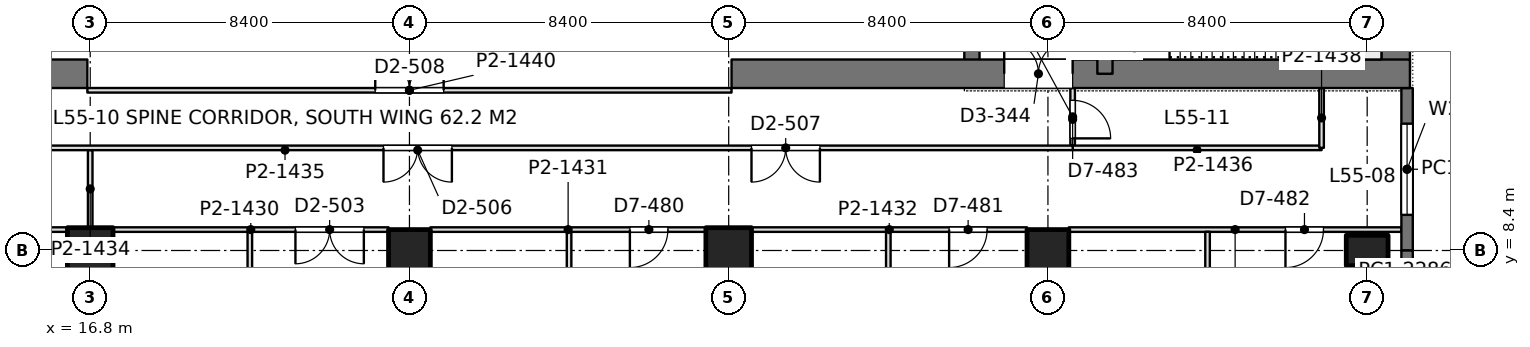
"""IFC4 building model, lengths in metres.
Left out: names, types, materials, properties, quantities, classifications, styles, units other than length and angle.
Written with IfcOpenShell. Run it as: python <this file> out.ifc"""

import sys

from ifc_helpers import new_model, si_unit, direction, frame, frame_2d, origin, origin_2d, place, context, subcontext, project, spatial, rectangle, extrude, element, fill, save


model = new_model("IFC4")
c1 = context("Model", 3, precision=1e-05, world=origin(), true_north=direction((0.0, 1.0)))
c2 = subcontext(c1, "Body", "Model", "MODEL_VIEW")
j1 = project(units=[si_unit("LENGTHUNIT", "METRE"), si_unit("PLANEANGLEUNIT", "RADIAN")], contexts=[c1])
p1 = place(None, origin())
s1 = spatial("IfcSite", under=j1, at=p1, CompositionType="ELEMENT")
p2 = place(p1, origin())
s2 = spatial("IfcBuilding", under=s1, at=p2, CompositionType="ELEMENT")
p3 = place(p2, frame((0.0, 0.0, 240.6)))
s3 = spatial("IfcBuildingStorey", under=s2, at=p3, CompositionType="ELEMENT", Elevation=240.6)
p4 = place(p3, frame((16.8, 8.4, 0.0), z_axis=(0.0, 0.0, 1.0), x_axis=(1.0, 0.0, 0.0)))
e1 = element("IfcColumn", 1, at=p4, inside=s3, PredefinedType="COLUMN", context=c2, shape_type="SweptSolid", body=[
    extrude(rectangle(XDim=1.2, YDim=1.2, at=origin_2d()), origin(), (0.0, 0.0, 1.0), 4.2),
])
p5 = place(p3, frame((25.2, 8.4, 0.0), z_axis=(0.0, 0.0, 1.0), x_axis=(1.0, 0.0, 0.0)))
e2 = element("IfcColumn", 2, at=p5, inside=s3, PredefinedType="COLUMN", context=c2, shape_type="SweptSolid", body=[
    extrude(rectangle(XDim=1.1, YDim=1.1, at=origin_2d()), origin(), (0.0, 0.0, 1.0), 4.2),
])
p6 = place(p3, frame((33.6, 8.4, 0.0), z_axis=(0.0, 0.0, 1.0), x_axis=(1.0, 0.0, 0.0)))
e3 = element("IfcColumn", 3, at=p6, inside=s3, PredefinedType="COLUMN", context=c2, shape_type="SweptSolid", body=[
    extrude(rectangle(XDim=1.2, YDim=1.2, at=origin_2d()), origin(), (0.0, 0.0, 1.0), 4.2),
])
p7 = place(p3, frame((42.0, 8.4, 0.0), z_axis=(0.0, 0.0, 1.0), x_axis=(1.0, 0.0, 0.0)))
e4 = element("IfcColumn", 4, at=p7, inside=s3, PredefinedType="COLUMN", context=c2, shape_type="SweptSolid", body=[
    extrude(rectangle(XDim=1.1, YDim=1.1, at=origin_2d()), origin(), (0.0, 0.0, 1.0), 4.2),
])
p8 = place(p3, frame((50.4, 8.4, 0.0), z_axis=(0.0, 0.0, 1.0), x_axis=(0.0, 1.0, 0.0)))
e5 = element("IfcColumn", 5, at=p8, inside=s3, PredefinedType="COLUMN", context=c2, shape_type="SweptSolid", body=[
    extrude(rectangle(XDim=0.8, YDim=1.1, at=origin_2d()), origin(), (0.0, 0.0, 1.0), 4.2),
])
p9 = place(p3, frame((-1.125, 13.05, 0.0), z_axis=(0.0, 0.0, 1.0), x_axis=(1.0, 0.0, 0.0)))
e6 = element("IfcWall", 6, at=p9, inside=s3, PredefinedType="SHEAR", context=c2, shape_type="SweptSolid", body=[
    extrude(rectangle(XDim=17.85, YDim=0.75, at=frame_2d((8.925, 0.0))), origin(), (0.0, 0.0, 1.0), 4.2),
])
p10 = place(p9, frame((8.875, 0.0, 0.0)))
e7 = element("IfcOpeningElement", 7, at=p10, cuts=e6, PredefinedType="OPENING", context=c2, shape_type="SweptSolid", body=[
    extrude(rectangle(XDim=1.8, YDim=2.4, at=frame_2d((0.9, 1.2))), frame((0.0, 0.385, 0.0), z_axis=(0.0, -1.0, 0.0), x_axis=(1.0, 0.0, 0.0)), (0.0, 0.0, 1.0), 0.77),
])
p11 = place(p3, frame((33.675, 13.05, 0.0), z_axis=(0.0, 0.0, 1.0), x_axis=(1.0, 0.0, 0.0)))
e8 = element("IfcWall", 8, at=p11, inside=s3, PredefinedType="SHEAR", context=c2, shape_type="SweptSolid", body=[
    extrude(rectangle(XDim=17.85, YDim=0.75, at=frame_2d((8.925, 0.0))), origin(), (0.0, 0.0, 1.0), 4.2),
])
p12 = place(p11, frame((7.175, 0.0, 0.0)))
e9 = element("IfcOpeningElement", 9, at=p12, cuts=e8, PredefinedType="OPENING", context=c2, shape_type="SweptSolid", body=[
    extrude(rectangle(XDim=1.8, YDim=2.4, at=frame_2d((0.9, 1.2))), frame((0.0, 0.385, 0.0), z_axis=(0.0, -1.0, 0.0), x_axis=(1.0, 0.0, 0.0)), (0.0, 0.0, 1.0), 0.77),
])
p13 = place(p3, frame((51.15, 13.05, 0.0), z_axis=(0.0, 0.0, 1.0), x_axis=(0.0, 1.0, 0.0)))
e10 = element("IfcWall", 10, at=p13, inside=s3, PredefinedType="SHEAR", context=c2, shape_type="SweptSolid", body=[
    extrude(rectangle(XDim=24.3, YDim=0.75, at=frame_2d((12.15, 0.0))), origin(), (0.0, 0.0, 1.0), 4.2),
])
p14 = place(p3, frame((43.5, 13.05, 0.0), z_axis=(0.0, 0.0, 1.0), x_axis=(0.0, 1.0, 0.0)))
e11 = element("IfcWall", 11, at=p14, inside=s3, PredefinedType="SHEAR", context=c2, shape_type="SweptSolid", body=[
    extrude(rectangle(XDim=24.3, YDim=0.4, at=frame_2d((12.15, 0.0))), origin(), (0.0, 0.0, 1.0), 4.2),
])
p15 = place(p14, frame((1.3, 0.0, 0.0)))
e12 = element("IfcOpeningElement", 12, at=p15, cuts=e11, PredefinedType="OPENING", context=c2, shape_type="SweptSolid", body=[
    extrude(rectangle(XDim=1.0, YDim=2.2, at=frame_2d((0.5, 1.1))), frame((0.0, 0.21, 0.0), z_axis=(0.0, -1.0, 0.0), x_axis=(1.0, 0.0, 0.0)), (0.0, 0.0, 1.0), 0.42),
])
p16 = place(p14, frame((22.0, 0.0, 0.0)))
e13 = element("IfcOpeningElement", 13, at=p16, cuts=e11, PredefinedType="OPENING", context=c2, shape_type="SweptSolid", body=[
    extrude(rectangle(XDim=1.0, YDim=2.2, at=frame_2d((0.5, 1.1))), frame((0.0, 0.21, 0.0), z_axis=(0.0, -1.0, 0.0), x_axis=(1.0, 0.0, 0.0)), (0.0, 0.0, 1.0), 0.42),
])
p17 = place(p14, frame((5.55, 0.0, 0.0)))
e14 = element("IfcOpeningElement", 14, at=p17, cuts=e11, PredefinedType="OPENING", context=c2, shape_type="SweptSolid", body=[
    extrude(rectangle(XDim=1.0, YDim=2.2, at=frame_2d((0.5, 1.1))), frame((0.0, 0.21, 0.0), z_axis=(0.0, -1.0, 0.0), x_axis=(1.0, 0.0, 0.0)), (0.0, 0.0, 1.0), 0.42),
])
p18 = place(p14, frame((9.55, 0.0, 0.0)))
e15 = element("IfcOpeningElement", 15, at=p18, cuts=e11, PredefinedType="OPENING", context=c2, shape_type="SweptSolid", body=[
    extrude(rectangle(XDim=1.0, YDim=2.2, at=frame_2d((0.5, 1.1))), frame((0.0, 0.21, 0.0), z_axis=(0.0, -1.0, 0.0), x_axis=(1.0, 0.0, 0.0)), (0.0, 0.0, 1.0), 0.42),
])
p19 = place(p14, frame((12.8, 0.0, 0.0)))
e16 = element("IfcOpeningElement", 16, at=p19, cuts=e11, PredefinedType="OPENING", context=c2, shape_type="SweptSolid", body=[
    extrude(rectangle(XDim=1.1, YDim=2.2, at=frame_2d((0.55, 1.1))), frame((0.0, 0.21, 0.0), z_axis=(0.0, -1.0, 0.0), x_axis=(1.0, 0.0, 0.0)), (0.0, 0.0, 1.0), 0.42),
])
p20 = place(p14, frame((15.538, 0.0, 0.0)))
e17 = element("IfcOpeningElement", 17, at=p20, cuts=e11, PredefinedType="OPENING", context=c2, shape_type="SweptSolid", body=[
    extrude(rectangle(XDim=1.1, YDim=2.2, at=frame_2d((0.55, 1.1))), frame((0.0, 0.21, 0.0), z_axis=(0.0, -1.0, 0.0), x_axis=(1.0, 0.0, 0.0)), (0.0, 0.0, 1.0), 0.42),
])
p21 = place(p14, frame((18.262, 0.0, 0.0)))
e18 = element("IfcOpeningElement", 18, at=p21, cuts=e11, PredefinedType="OPENING", context=c2, shape_type="SweptSolid", body=[
    extrude(rectangle(XDim=1.1, YDim=2.2, at=frame_2d((0.55, 1.1))), frame((0.0, 0.21, 0.0), z_axis=(0.0, -1.0, 0.0), x_axis=(1.0, 0.0, 0.0)), (0.0, 0.0, 1.0), 0.42),
])
p22 = place(p3, frame((40.0, 13.05, 0.0), z_axis=(0.0, 0.0, 1.0), x_axis=(0.0, 1.0, 0.0)))
e19 = element("IfcWall", 19, at=p22, inside=s3, PredefinedType="SHEAR", context=c2, shape_type="SweptSolid", body=[
    extrude(rectangle(XDim=24.3, YDim=0.4, at=frame_2d((12.15, 0.0))), origin(), (0.0, 0.0, 1.0), 4.2),
])
p23 = place(p22, frame((15.75, 0.0, 0.0)))
e20 = element("IfcOpeningElement", 20, at=p23, cuts=e19, PredefinedType="OPENING", context=c2, shape_type="SweptSolid", body=[
    extrude(rectangle(XDim=1.1, YDim=2.2, at=frame_2d((0.55, 1.1))), frame((0.0, 0.21, 0.0), z_axis=(0.0, -1.0, 0.0), x_axis=(1.0, 0.0, 0.0)), (0.0, 0.0, 1.0), 0.42),
])
p24 = place(p22, frame((18.6, 0.0, 0.0)))
e21 = element("IfcOpeningElement", 21, at=p24, cuts=e19, PredefinedType="OPENING", context=c2, shape_type="SweptSolid", body=[
    extrude(rectangle(XDim=1.1, YDim=2.2, at=frame_2d((0.55, 1.1))), frame((0.0, 0.21, 0.0), z_axis=(0.0, -1.0, 0.0), x_axis=(1.0, 0.0, 0.0)), (0.0, 0.0, 1.0), 0.42),
])
p25 = place(p22, frame((21.45, 0.0, 0.0)))
e22 = element("IfcOpeningElement", 22, at=p25, cuts=e19, PredefinedType="OPENING", context=c2, shape_type="SweptSolid", body=[
    extrude(rectangle(XDim=1.1, YDim=2.2, at=frame_2d((0.55, 1.1))), frame((0.0, 0.21, 0.0), z_axis=(0.0, -1.0, 0.0), x_axis=(1.0, 0.0, 0.0)), (0.0, 0.0, 1.0), 0.42),
])
p26 = place(p22, frame((8.65, 0.0, 0.0)))
e23 = element("IfcOpeningElement", 23, at=p26, cuts=e19, PredefinedType="OPENING", context=c2, shape_type="SweptSolid", body=[
    extrude(rectangle(XDim=1.8, YDim=2.4, at=frame_2d((0.9, 1.2))), frame((0.0, 0.21, 0.0), z_axis=(0.0, -1.0, 0.0), x_axis=(1.0, 0.0, 0.0)), (0.0, 0.0, 1.0), 0.42),
])
p27 = place(p3, frame((51.45, 12.675, 0.0), z_axis=(0.0, 0.0, 1.0), x_axis=(0.0, -1.0, 0.0)))
e24 = element("IfcWall", 24, at=p27, inside=s3, PredefinedType="SOLIDWALL", context=c2, shape_type="SweptSolid", body=[
    extrude(rectangle(XDim=4.275, YDim=0.3, at=frame_2d((2.138, 0.0))), origin(), (0.0, 0.0, 1.0), 4.0),
])
p28 = place(p27, frame((0.938, 0.0, 0.9)))
e25 = element("IfcOpeningElement", 25, at=p28, cuts=e24, PredefinedType="OPENING", context=c2, shape_type="SweptSolid", body=[
    extrude(rectangle(XDim=2.4, YDim=1.9, at=frame_2d((1.2, 0.95))), frame((0.0, 0.16, 0.0), z_axis=(0.0, -1.0, 0.0), x_axis=(1.0, 0.0, 0.0)), (0.0, 0.0, 1.0), 0.32),
])
p29 = place(p3, frame((51.45, 8.4, 0.0), z_axis=(0.0, 0.0, 1.0), x_axis=(0.0, -1.0, 0.0)))
e26 = element("IfcWall", 26, at=p29, inside=s3, PredefinedType="SOLIDWALL", context=c2, shape_type="SweptSolid", body=[
    extrude(rectangle(XDim=2.485, YDim=0.3, at=frame_2d((1.243, 0.0))), origin(), (0.0, 0.0, 1.0), 4.0),
])
p30 = place(p3, frame((8.949, 8.95, 0.0), z_axis=(0.0, 0.0, 1.0), x_axis=(1.0, 0.0, 0.0)))
e27 = element("IfcWall", 27, at=p30, inside=s3, PredefinedType="PARTITIONING", context=c2, shape_type="SweptSolid", body=[
    extrude(rectangle(XDim=7.252, YDim=0.12, at=frame_2d((3.626, 0.0))), origin(), (0.0, 0.0, 1.0), 3.4),
])
p31 = place(p30, frame((5.251, 0.0, 0.0)))
e28 = element("IfcOpeningElement", 28, at=p31, cuts=e27, PredefinedType="OPENING", context=c2, shape_type="SweptSolid", body=[
    extrude(rectangle(XDim=1.0, YDim=2.4, at=frame_2d((0.5, 1.2))), frame((0.0, 0.07, 0.0), z_axis=(0.0, -1.0, 0.0), x_axis=(1.0, 0.0, 0.0)), (0.0, 0.0, 1.0), 0.14),
])
p32 = place(p3, frame((17.399, 8.95, 0.0), z_axis=(0.0, 0.0, 1.0), x_axis=(1.0, 0.0, 0.0)))
e29 = element("IfcWall", 29, at=p32, inside=s3, PredefinedType="PARTITIONING", context=c2, shape_type="SweptSolid", body=[
    extrude(rectangle(XDim=7.252, YDim=0.12, at=frame_2d((3.626, 0.0))), origin(), (0.0, 0.0, 1.0), 3.4),
])
p33 = place(p32, frame((4.801, 0.0, 0.0)))
e30 = element("IfcOpeningElement", 30, at=p33, cuts=e29, PredefinedType="OPENING", context=c2, shape_type="SweptSolid", body=[
    extrude(rectangle(XDim=1.8, YDim=2.2, at=frame_2d((0.9, 1.1))), frame((0.0, 0.07, 0.0), z_axis=(0.0, -1.0, 0.0), x_axis=(1.0, 0.0, 0.0)), (0.0, 0.0, 1.0), 0.14),
])
p34 = place(p3, frame((25.749, 8.95, 0.0), z_axis=(0.0, 0.0, 1.0), x_axis=(1.0, 0.0, 0.0)))
e31 = element("IfcWall", 31, at=p34, inside=s3, PredefinedType="PARTITIONING", context=c2, shape_type="SweptSolid", body=[
    extrude(rectangle(XDim=7.252, YDim=0.12, at=frame_2d((3.626, 0.0))), origin(), (0.0, 0.0, 1.0), 3.4),
])
p35 = place(p34, frame((5.251, 0.0, 0.0)))
e32 = element("IfcOpeningElement", 32, at=p35, cuts=e31, PredefinedType="OPENING", context=c2, shape_type="SweptSolid", body=[
    extrude(rectangle(XDim=1.0, YDim=2.4, at=frame_2d((0.5, 1.2))), frame((0.0, 0.07, 0.0), z_axis=(0.0, -1.0, 0.0), x_axis=(1.0, 0.0, 0.0)), (0.0, 0.0, 1.0), 0.14),
])
p36 = place(p3, frame((34.199, 8.95, 0.0), z_axis=(0.0, 0.0, 1.0), x_axis=(1.0, 0.0, 0.0)))
e33 = element("IfcWall", 33, at=p36, inside=s3, PredefinedType="PARTITIONING", context=c2, shape_type="SweptSolid", body=[
    extrude(rectangle(XDim=7.252, YDim=0.12, at=frame_2d((3.626, 0.0))), origin(), (0.0, 0.0, 1.0), 3.4),
])
p37 = place(p36, frame((5.201, 0.0, 0.0)))
e34 = element("IfcOpeningElement", 34, at=p37, cuts=e33, PredefinedType="OPENING", context=c2, shape_type="SweptSolid", body=[
    extrude(rectangle(XDim=1.0, YDim=2.4, at=frame_2d((0.5, 1.2))), frame((0.0, 0.07, 0.0), z_axis=(0.0, -1.0, 0.0), x_axis=(1.0, 0.0, 0.0)), (0.0, 0.0, 1.0), 0.14),
])
p38 = place(p3, frame((42.549, 8.95, 0.0), z_axis=(0.0, 0.0, 1.0), x_axis=(1.0, 0.0, 0.0)))
e35 = element("IfcWall", 35, at=p38, inside=s3, PredefinedType="PARTITIONING", context=c2, shape_type="SweptSolid", body=[
    extrude(rectangle(XDim=8.753, YDim=0.12, at=frame_2d((4.376, 0.0))), origin(), (0.0, 0.0, 1.0), 3.62),
])
p39 = place(p38, frame((5.701, 0.0, 0.0)))
e36 = element("IfcOpeningElement", 36, at=p39, cuts=e35, PredefinedType="OPENING", context=c2, shape_type="SweptSolid", body=[
    extrude(rectangle(XDim=1.0, YDim=2.4, at=frame_2d((0.5, 1.2))), frame((0.0, 0.07, 0.0), z_axis=(0.0, -1.0, 0.0), x_axis=(1.0, 0.0, 0.0)), (0.0, 0.0, 1.0), 0.14),
])
for number, where, z_axis, x_axis in (
    (37, (21.0, 4.7, 0.0), (0.0, 0.0, 1.0), (0.0, 1.0, 0.0)),
    (38, (29.4, 4.7, 0.0), (0.0, 0.0, 1.0), (0.0, 1.0, 0.0)),
    (39, (37.8, 4.7, 0.0), (0.0, 0.0, 1.0), (0.0, 1.0, 0.0)),
    (40, (46.2, 4.7, 0.0), (0.0, 0.0, 1.0), (0.0, 1.0, 0.0)),
):
    element("IfcWall", number, at=place(p3, frame(where, z_axis=z_axis, x_axis=x_axis)), inside=s3, PredefinedType="PARTITIONING", context=c2, shape_type="SweptSolid", body=[
        extrude(rectangle(XDim=4.192, YDim=0.12, at=frame_2d((2.096, 0.0))), origin(), (0.0, 0.0, 1.0), 3.3),
    ])
p40 = place(p3, frame((16.8, 8.999, 0.0), z_axis=(0.0, 0.0, 1.0), x_axis=(0.0, 1.0, 0.0)))
e41 = element("IfcWall", 41, at=p40, inside=s3, PredefinedType="PARTITIONING", context=c2, shape_type="SweptSolid", body=[
    extrude(rectangle(XDim=2.043, YDim=0.12, at=frame_2d((1.021, 0.0))), origin(), (0.0, 0.0, 1.0), 3.543),
])
p41 = place(p3, frame((1.2, 11.1, 0.0), z_axis=(0.0, 0.0, 1.0), x_axis=(1.0, 0.0, 0.0)))
e42 = element("IfcWall", 42, at=p41, inside=s3, PredefinedType="PARTITIONING", context=c2, shape_type="SweptSolid", body=[
    extrude(rectangle(XDim=41.452, YDim=0.12, at=frame_2d((20.726, 0.0))), origin(), (0.0, 0.0, 1.0), 3.3),
])
p42 = place(p41, frame((4.3, 0.0, 0.0)))
e43 = element("IfcOpeningElement", 43, at=p42, cuts=e42, PredefinedType="OPENING", context=c2, shape_type="SweptSolid", body=[
    extrude(rectangle(XDim=1.8, YDim=2.2, at=frame_2d((0.9, 1.1))), frame((0.0, 0.07, 0.0), z_axis=(0.0, -1.0, 0.0), x_axis=(1.0, 0.0, 0.0)), (0.0, 0.0, 1.0), 0.14),
])
p43 = place(p41, frame((9.5, 0.0, 0.0)))
e44 = element("IfcOpeningElement", 44, at=p43, cuts=e42, PredefinedType="OPENING", context=c2, shape_type="SweptSolid", body=[
    extrude(rectangle(XDim=1.8, YDim=2.2, at=frame_2d((0.9, 1.1))), frame((0.0, 0.07, 0.0), z_axis=(0.0, -1.0, 0.0), x_axis=(1.0, 0.0, 0.0)), (0.0, 0.0, 1.0), 0.14),
])
p44 = place(p41, frame((23.317, 0.0, 0.0)))
e45 = element("IfcOpeningElement", 45, at=p44, cuts=e42, PredefinedType="OPENING", context=c2, shape_type="SweptSolid", body=[
    extrude(rectangle(XDim=1.8, YDim=2.2, at=frame_2d((0.9, 1.1))), frame((0.0, 0.07, 0.0), z_axis=(0.0, -1.0, 0.0), x_axis=(1.0, 0.0, 0.0)), (0.0, 0.0, 1.0), 0.14),
])
p45 = place(p41, frame((33.0, 0.0, 0.0)))
e46 = element("IfcOpeningElement", 46, at=p45, cuts=e42, PredefinedType="OPENING", context=c2, shape_type="SweptSolid", body=[
    extrude(rectangle(XDim=1.8, YDim=2.2, at=frame_2d((0.9, 1.1))), frame((0.0, 0.07, 0.0), z_axis=(0.0, -1.0, 0.0), x_axis=(1.0, 0.0, 0.0)), (0.0, 0.0, 1.0), 0.14),
])
p46 = place(p3, frame((42.65, 11.158, 0.0), z_axis=(0.0, 0.0, 1.0), x_axis=(0.0, 1.0, 0.0)))
e47 = element("IfcWall", 47, at=p46, inside=s3, PredefinedType="PARTITIONING", context=c2, shape_type="SweptSolid", body=[
    extrude(rectangle(XDim=1.518, YDim=0.12, at=frame_2d((0.759, 0.0))), origin(), (0.0, 0.0, 1.0), 4.0),
])
p47 = place(p46, frame((0.192, 0.0, 0.0)))
e48 = element("IfcOpeningElement", 48, at=p47, cuts=e47, PredefinedType="OPENING", context=c2, shape_type="SweptSolid", body=[
    extrude(rectangle(XDim=1.0, YDim=2.4, at=frame_2d((0.5, 1.2))), frame((0.0, 0.07, 0.0), z_axis=(0.0, -1.0, 0.0), x_axis=(1.0, 0.0, 0.0)), (0.0, 0.0, 1.0), 0.14),
])
p48 = place(p3, frame((42.648, 11.1, 0.0), z_axis=(0.0, 0.0, 1.0), x_axis=(1.0, 0.0, 0.0)))
e49 = element("IfcWall", 49, at=p48, inside=s3, PredefinedType="PARTITIONING", context=c2, shape_type="SweptSolid", body=[
    extrude(rectangle(XDim=6.552, YDim=0.12, at=frame_2d((3.276, 0.0))), origin(), (0.0, 0.0, 1.0), 4.0),
])
p49 = place(p3, frame((49.2, 11.1, 0.0), z_axis=(0.0, 0.0, 1.0), x_axis=(0.0, 1.0, 0.0)))
e50 = element("IfcWall", 50, at=p49, inside=s3, PredefinedType="PARTITIONING", context=c2, shape_type="SweptSolid", body=[
    extrude(rectangle(XDim=1.576, YDim=0.12, at=frame_2d((0.788, 0.0))), origin(), (0.0, 0.0, 1.0), 4.0),
])
p50 = place(p3, frame((16.725, 12.615, 0.0), z_axis=(0.0, 0.0, 1.0), x_axis=(1.0, 0.0, 0.0)))
e51 = element("IfcWall", 51, at=p50, inside=s3, PredefinedType="PARTITIONING", context=c2, shape_type="SweptSolid", body=[
    extrude(rectangle(XDim=16.95, YDim=0.12, at=frame_2d((8.475, 0.0))), origin(), (0.0, 0.0, 1.0), 3.3),
])
p51 = place(p50, frame((7.575, 0.0, 0.0)))
e52 = element("IfcOpeningElement", 52, at=p51, cuts=e51, PredefinedType="OPENING", context=c2, shape_type="SweptSolid", body=[
    extrude(rectangle(XDim=1.8, YDim=2.2, at=frame_2d((0.9, 1.1))), frame((0.0, 0.07, 0.0), z_axis=(0.0, -1.0, 0.0), x_axis=(1.0, 0.0, 0.0)), (0.0, 0.0, 1.0), 0.14),
])
p52 = place(p28, origin())
e53 = element("IfcWindow", 53, at=p52, inside=s3, PartitioningType="SINGLE_PANEL", PredefinedType="WINDOW", context=c2, shape_type="SweptSolid", body=[
    extrude(rectangle(XDim=2.4, YDim=1.9, at=frame_2d((1.2, 0.95))), frame((0.0, 0.03, 0.0), z_axis=(0.0, -1.0, 0.0), x_axis=(1.0, 0.0, 0.0)), (0.0, 0.0, 1.0), 0.06),
])
fill(e25, e53)
p53 = place(p12, origin())
e54 = element("IfcDoor", 54, at=p53, inside=s3, OperationType="DOUBLE_DOOR_SINGLE_SWING", PredefinedType="DOOR", context=c2, shape_type="SweptSolid", body=[
    extrude(rectangle(XDim=1.8, YDim=2.4, at=frame_2d((0.9, 1.2))), frame((0.0, 0.025, 0.0), z_axis=(0.0, -1.0, 0.0), x_axis=(1.0, 0.0, 0.0)), (0.0, 0.0, 1.0), 0.05),
])
fill(e9, e54)
p54 = place(p33, frame((1.8, 0.0, 0.0), z_axis=(0.0, 0.0, 1.0), x_axis=(-1.0, 0.0, 0.0)))
e55 = element("IfcDoor", 55, at=p54, inside=s3, OperationType="DOUBLE_DOOR_SINGLE_SWING", PredefinedType="DOOR", context=c2, shape_type="SweptSolid", body=[
    extrude(rectangle(XDim=1.8, YDim=2.2, at=frame_2d((0.9, 1.1))), frame((0.0, 0.025, 0.0), z_axis=(0.0, -1.0, 0.0), x_axis=(1.0, 0.0, 0.0)), (0.0, 0.0, 1.0), 0.05),
])
fill(e30, e55)
p55 = place(p35, frame((1.0, 0.0, 0.0), z_axis=(0.0, 0.0, 1.0), x_axis=(-1.0, 0.0, 0.0)))
e56 = element("IfcDoor", 56, at=p55, inside=s3, OperationType="SINGLE_SWING_RIGHT", PredefinedType="DOOR", context=c2, shape_type="SweptSolid", body=[
    extrude(rectangle(XDim=1.0, YDim=2.4, at=frame_2d((0.5, 1.2))), frame((0.0, 0.025, 0.0), z_axis=(0.0, -1.0, 0.0), x_axis=(1.0, 0.0, 0.0)), (0.0, 0.0, 1.0), 0.05),
])
fill(e32, e56)
p56 = place(p37, frame((1.0, 0.0, 0.0), z_axis=(0.0, 0.0, 1.0), x_axis=(-1.0, 0.0, 0.0)))
e57 = element("IfcDoor", 57, at=p56, inside=s3, OperationType="SINGLE_SWING_RIGHT", PredefinedType="DOOR", context=c2, shape_type="SweptSolid", body=[
    extrude(rectangle(XDim=1.0, YDim=2.4, at=frame_2d((0.5, 1.2))), frame((0.0, 0.025, 0.0), z_axis=(0.0, -1.0, 0.0), x_axis=(1.0, 0.0, 0.0)), (0.0, 0.0, 1.0), 0.05),
])
fill(e34, e57)
p57 = place(p39, frame((1.0, 0.0, 0.0), z_axis=(0.0, 0.0, 1.0), x_axis=(-1.0, 0.0, 0.0)))
e58 = element("IfcDoor", 58, at=p57, inside=s3, OperationType="SINGLE_SWING_RIGHT", PredefinedType="DOOR", context=c2, shape_type="SweptSolid", body=[
    extrude(rectangle(XDim=1.0, YDim=2.4, at=frame_2d((0.5, 1.2))), frame((0.0, 0.025, 0.0), z_axis=(0.0, -1.0, 0.0), x_axis=(1.0, 0.0, 0.0)), (0.0, 0.0, 1.0), 0.05),
])
fill(e36, e58)
p58 = place(p44, frame((1.8, 0.0, 0.0), z_axis=(0.0, 0.0, 1.0), x_axis=(-1.0, 0.0, 0.0)))
e59 = element("IfcDoor", 59, at=p58, inside=s3, OperationType="DOUBLE_DOOR_SINGLE_SWING", PredefinedType="DOOR", context=c2, shape_type="SweptSolid", body=[
    extrude(rectangle(XDim=1.8, YDim=2.2, at=frame_2d((0.9, 1.1))), frame((0.0, 0.025, 0.0), z_axis=(0.0, -1.0, 0.0), x_axis=(1.0, 0.0, 0.0)), (0.0, 0.0, 1.0), 0.05),
])
fill(e45, e59)
p59 = place(p45, frame((1.8, 0.0, 0.0), z_axis=(0.0, 0.0, 1.0), x_axis=(-1.0, 0.0, 0.0)))
e60 = element("IfcDoor", 60, at=p59, inside=s3, OperationType="DOUBLE_DOOR_SINGLE_SWING", PredefinedType="DOOR", context=c2, shape_type="SweptSolid", body=[
    extrude(rectangle(XDim=1.8, YDim=2.2, at=frame_2d((0.9, 1.1))), frame((0.0, 0.025, 0.0), z_axis=(0.0, -1.0, 0.0), x_axis=(1.0, 0.0, 0.0)), (0.0, 0.0, 1.0), 0.05),
])
fill(e46, e60)
p60 = place(p47, frame((1.0, 0.0, 0.0), z_axis=(0.0, 0.0, 1.0), x_axis=(-1.0, 0.0, 0.0)))
e61 = element("IfcDoor", 61, at=p60, inside=s3, OperationType="SINGLE_SWING_RIGHT", PredefinedType="DOOR", context=c2, shape_type="SweptSolid", body=[
    extrude(rectangle(XDim=1.0, YDim=2.4, at=frame_2d((0.5, 1.2))), frame((0.0, 0.025, 0.0), z_axis=(0.0, -1.0, 0.0), x_axis=(1.0, 0.0, 0.0)), (0.0, 0.0, 1.0), 0.05),
])
fill(e48, e61)
p61 = place(p51, origin())
e62 = element("IfcDoor", 62, at=p61, inside=s3, OperationType="DOUBLE_DOOR_SINGLE_SWING", PredefinedType="DOOR", context=c2, shape_type="SweptSolid", body=[
    extrude(rectangle(XDim=1.8, YDim=2.2, at=frame_2d((0.9, 1.1))), frame((0.0, 0.025, 0.0), z_axis=(0.0, -1.0, 0.0), x_axis=(1.0, 0.0, 0.0)), (0.0, 0.0, 1.0), 0.05),
])
fill(e52, e62)
save(model, sys.argv[1])
